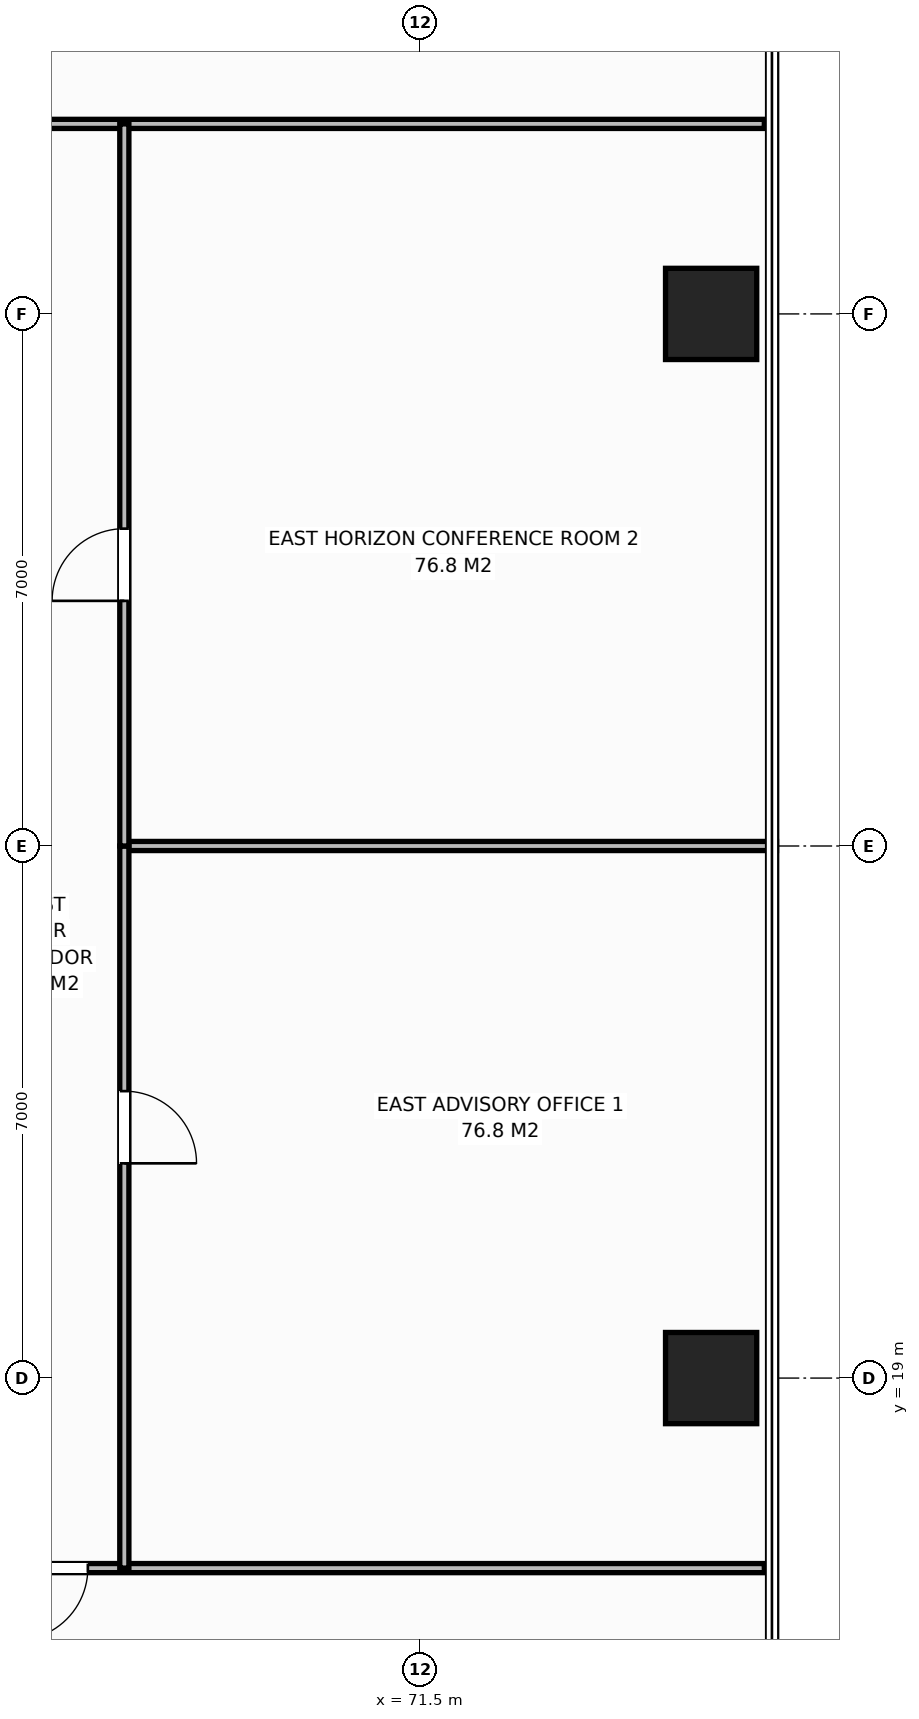
"""IFC4 building model, lengths in metres.
Left out: names, types, materials, properties, quantities, classifications, styles, units other than length and angle.
Written with IfcOpenShell. Run it as: python <this file> out.ifc"""

import sys

from ifc_helpers import new_model, si_unit, direction, frame, frame_2d, origin, origin_2d, place, context, subcontext, project, spatial, rectangle, extrude, element, fill, save


model = new_model("IFC4")
c1 = context("Model", 3, precision=1e-05, world=origin(), true_north=direction((0.0, 1.0)))
c2 = subcontext(c1, "Body", "Model", "MODEL_VIEW")
j1 = project(units=[si_unit("LENGTHUNIT", "METRE"), si_unit("PLANEANGLEUNIT", "RADIAN")], contexts=[c1])
p1 = place(None, origin())
s1 = spatial("IfcSite", under=j1, at=p1, CompositionType="ELEMENT")
p2 = place(p1, origin())
s2 = spatial("IfcBuilding", under=s1, at=p2, CompositionType="ELEMENT")
p3 = place(p2, frame((0.0, 0.0, 97.4)))
s3 = spatial("IfcBuildingStorey", under=s2, at=p3, CompositionType="ELEMENT", Elevation=97.4)
for number, where, z_axis, x_axis in (
    (1, (75.32, 19.0, 0.0), (0.0, 0.0, 1.0), (1.0, 0.0, 0.0)),
    (2, (75.32, 33.0, 0.0), (0.0, 0.0, 1.0), (1.0, 0.0, 0.0)),
):
    element("IfcColumn", number, at=place(p3, frame(where, z_axis=z_axis, x_axis=x_axis)), inside=s3, PredefinedType="COLUMN", context=c2, shape_type="SweptSolid", body=[
        extrude(rectangle(XDim=1.2, YDim=1.2, at=origin_2d()), origin(), (0.0, 0.0, 1.0), 3.8),
    ])
p4 = place(p3, frame((57.637, 35.5, 0.0), z_axis=(0.0, 0.0, 1.0), x_axis=(1.0, 0.0, 0.0)))
e3 = element("IfcWall", 3, at=p4, inside=s3, PredefinedType="PARTITIONING", context=c2, shape_type="SweptSolid", body=[
    extrude(rectangle(XDim=18.383, YDim=0.12, at=frame_2d((9.192, 0.0))), origin(), (0.0, 0.0, 1.0), 3.565),
])
p5 = place(p4, frame((4.507, 0.0, 0.0)))
e4 = element("IfcOpeningElement", 4, at=p5, cuts=e3, PredefinedType="OPENING", context=c2, shape_type="SweptSolid", body=[
    extrude(rectangle(XDim=0.95, YDim=2.15, at=frame_2d((0.475, 1.075))), frame((0.0, 0.07, 0.0), z_axis=(0.0, -1.0, 0.0), x_axis=(1.0, 0.0, 0.0)), (0.0, 0.0, 1.0), 0.14),
])
p6 = place(p3, frame((64.86, 16.5, 0.0), z_axis=(0.0, 0.0, 1.0), x_axis=(1.0, 0.0, 0.0)))
e5 = element("IfcWall", 5, at=p6, inside=s3, PredefinedType="PARTITIONING", context=c2, shape_type="SweptSolid", body=[
    extrude(rectangle(XDim=11.16, YDim=0.12, at=frame_2d((5.58, 0.0))), origin(), (0.0, 0.0, 1.0), 3.565),
])
p7 = place(p6, frame((1.31, 0.0, 0.0)))
e6 = element("IfcOpeningElement", 6, at=p7, cuts=e5, PredefinedType="OPENING", context=c2, shape_type="SweptSolid", body=[
    extrude(rectangle(XDim=0.95, YDim=2.15, at=frame_2d((0.475, 1.075))), frame((0.0, 0.07, 0.0), z_axis=(0.0, -1.0, 0.0), x_axis=(1.0, 0.0, 0.0)), (0.0, 0.0, 1.0), 0.14),
])
p8 = place(p3, frame((67.6, 26.0, 0.0), z_axis=(0.0, 0.0, 1.0), x_axis=(1.0, 0.0, 0.0)))
e7 = element("IfcWall", 7, at=p8, inside=s3, PredefinedType="PARTITIONING", context=c2, shape_type="SweptSolid", body=[
    extrude(rectangle(XDim=8.58, YDim=0.12, at=frame_2d((4.29, 0.0))), origin(), (0.0, 0.0, 1.0), 3.565),
])
p9 = place(p3, frame((67.6, 16.5, 0.0), z_axis=(0.0, 0.0, 1.0), x_axis=(0.0, 1.0, 0.0)))
e8 = element("IfcWall", 8, at=p9, inside=s3, PredefinedType="PARTITIONING", context=c2, shape_type="SweptSolid", body=[
    extrude(rectangle(XDim=9.5, YDim=0.12, at=frame_2d((4.75, 0.0))), origin(), (0.0, 0.0, 1.0), 3.565),
])
p10 = place(p9, frame((5.325, 0.0, 0.0)))
e9 = element("IfcOpeningElement", 9, at=p10, cuts=e8, PredefinedType="OPENING", context=c2, shape_type="SweptSolid", body=[
    extrude(rectangle(XDim=0.95, YDim=2.15, at=frame_2d((0.475, 1.075))), frame((0.0, 0.07, 0.0), z_axis=(0.0, -1.0, 0.0), x_axis=(1.0, 0.0, 0.0)), (0.0, 0.0, 1.0), 0.14),
])
p11 = place(p3, frame((67.6, 26.0, 0.0), z_axis=(0.0, 0.0, 1.0), x_axis=(0.0, 1.0, 0.0)))
e10 = element("IfcWall", 10, at=p11, inside=s3, PredefinedType="PARTITIONING", context=c2, shape_type="SweptSolid", body=[
    extrude(rectangle(XDim=9.5, YDim=0.12, at=frame_2d((4.75, 0.0))), origin(), (0.0, 0.0, 1.0), 3.565),
])
p12 = place(p11, frame((3.225, 0.0, 0.0)))
e11 = element("IfcOpeningElement", 11, at=p12, cuts=e10, PredefinedType="OPENING", context=c2, shape_type="SweptSolid", body=[
    extrude(rectangle(XDim=0.95, YDim=2.15, at=frame_2d((0.475, 1.075))), frame((0.0, 0.07, 0.0), z_axis=(0.0, -1.0, 0.0), x_axis=(1.0, 0.0, 0.0)), (0.0, 0.0, 1.0), 0.14),
])
p13 = place(p7, origin())
e12 = element("IfcDoor", 12, at=p13, inside=s3, OperationType="SINGLE_SWING_RIGHT", PredefinedType="DOOR", context=c2, shape_type="SweptSolid", body=[
    extrude(rectangle(XDim=0.95, YDim=2.15, at=frame_2d((0.475, 1.075))), frame((0.0, 0.025, 0.0), z_axis=(0.0, -1.0, 0.0), x_axis=(1.0, 0.0, 0.0)), (0.0, 0.0, 1.0), 0.05),
])
fill(e6, e12)
p14 = place(p10, origin())
e13 = element("IfcDoor", 13, at=p14, inside=s3, OperationType="SINGLE_SWING_RIGHT", PredefinedType="DOOR", context=c2, shape_type="SweptSolid", body=[
    extrude(rectangle(XDim=0.95, YDim=2.15, at=frame_2d((0.475, 1.075))), frame((0.0, 0.025, 0.0), z_axis=(0.0, -1.0, 0.0), x_axis=(1.0, 0.0, 0.0)), (0.0, 0.0, 1.0), 0.05),
])
fill(e9, e13)
p15 = place(p12, origin())
e14 = element("IfcDoor", 14, at=p15, inside=s3, OperationType="SINGLE_SWING_LEFT", PredefinedType="DOOR", context=c2, shape_type="SweptSolid", body=[
    extrude(rectangle(XDim=0.95, YDim=2.15, at=frame_2d((0.475, 1.075))), frame((0.0, 0.025, 0.0), z_axis=(0.0, -1.0, 0.0), x_axis=(1.0, 0.0, 0.0)), (0.0, 0.0, 1.0), 0.05),
])
fill(e11, e14)
save(model, sys.argv[1])
